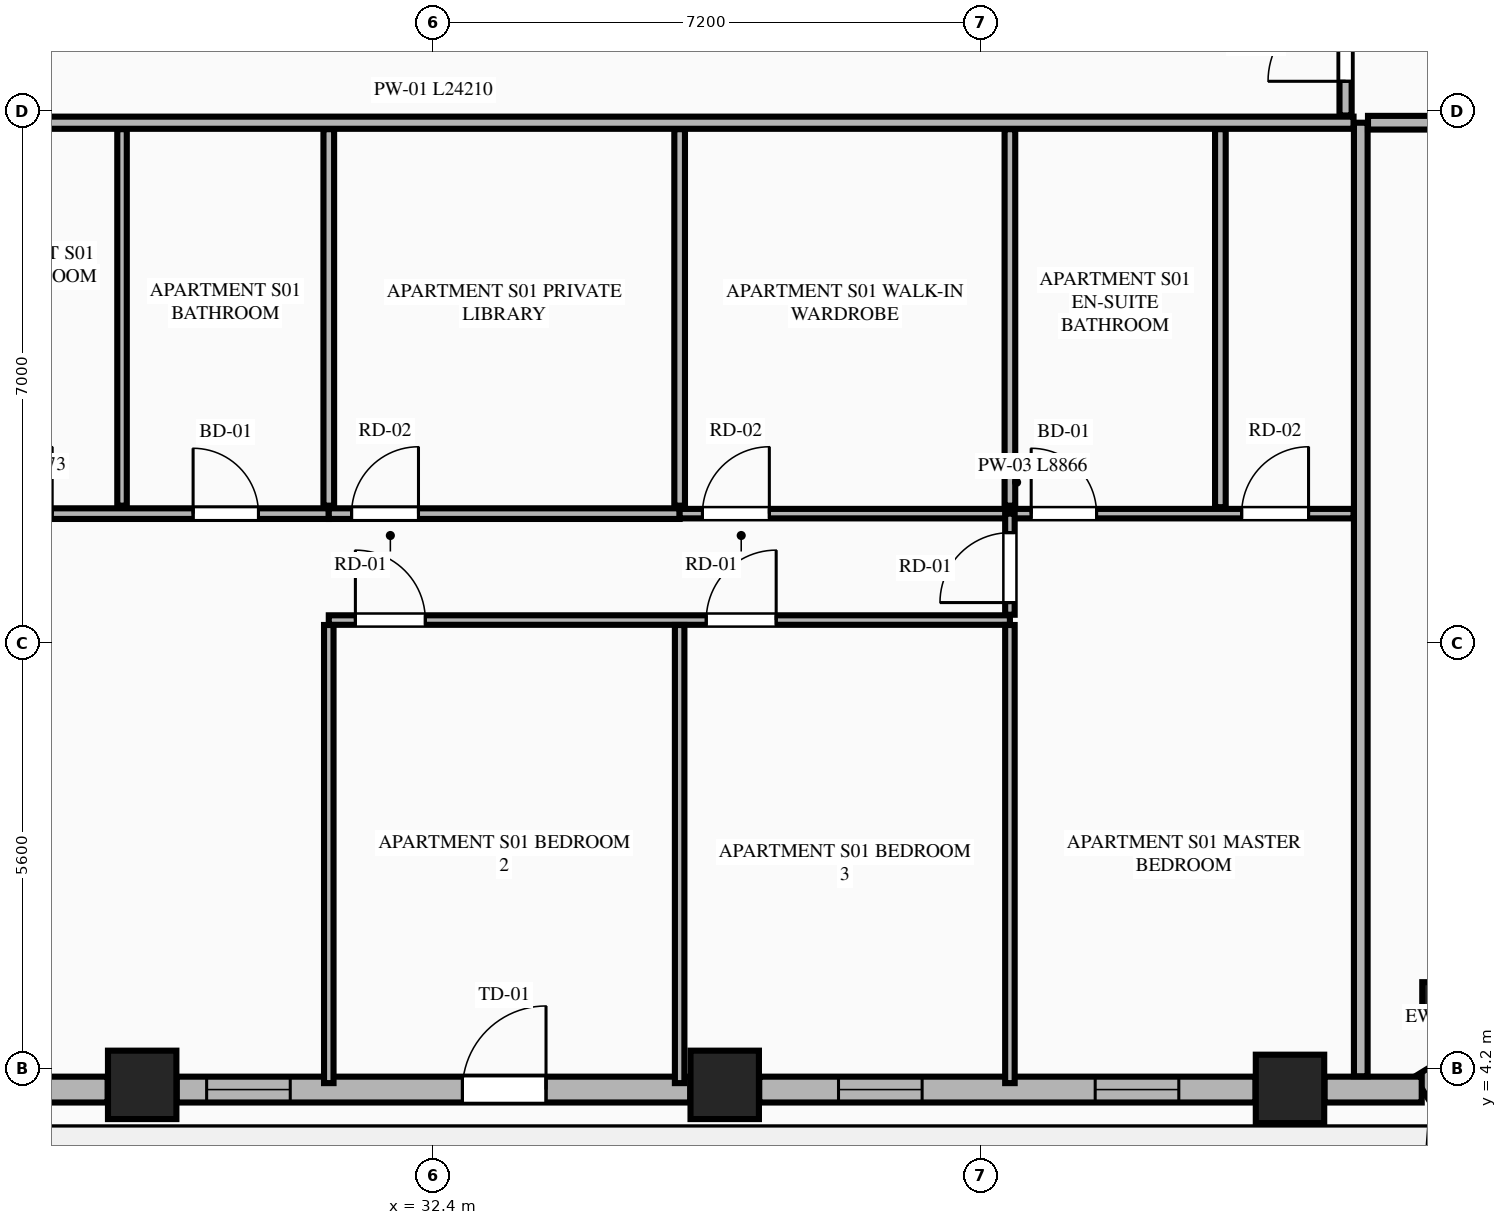
"""IFC4 building model, lengths in metres.
Left out: names, types, materials, properties, quantities, classifications, styles, units other than length and angle.
Written with IfcOpenShell. Run it as: python <this file> out.ifc"""

import sys

from ifc_helpers import new_model, si_unit, direction, frame, frame_2d, origin, origin_2d, place, context, subcontext, project, spatial, rectangle, extrude, element, fill, save


model = new_model("IFC4")
c1 = context("Model", 3, precision=1e-05, world=origin(), true_north=direction((0.0, 1.0)))
c2 = subcontext(c1, "Body", "Model", "MODEL_VIEW")
j1 = project(units=[si_unit("LENGTHUNIT", "METRE"), si_unit("PLANEANGLEUNIT", "RADIAN")], contexts=[c1])
p1 = place(None, origin())
s1 = spatial("IfcSite", under=j1, at=p1, CompositionType="ELEMENT")
p2 = place(p1, origin())
s2 = spatial("IfcBuilding", under=s1, at=p2, CompositionType="ELEMENT")
p3 = place(p2, frame((0.0, 0.0, 164.15)))
s3 = spatial("IfcBuildingStorey", under=s2, at=p3, CompositionType="ELEMENT", Elevation=164.15)
for number, where, z_axis, x_axis in (
    (1, (28.568, 3.992, 0.0), (0.0, 0.0, 1.0), (1.0, 0.0, 0.0)),
    (2, (36.232, 3.992, 0.0), (0.0, 0.0, 1.0), (1.0, 0.0, 0.0)),
    (3, (43.669, 3.939, 0.0), (0.0, 0.0, 1.0), (1.0, 0.0, 0.0)),
):
    element("IfcColumn", number, at=place(p3, frame(where, z_axis=z_axis, x_axis=x_axis)), inside=s3, PredefinedType="COLUMN", context=c2, shape_type="SweptSolid", body=[
        extrude(rectangle(XDim=0.9, YDim=0.9, at=origin_2d()), origin(), (0.0, 0.0, 1.0), 3.55),
    ])
p4 = place(p3, frame((45.659, 5.093, 0.0), z_axis=(0.0, 0.0, 1.0), x_axis=(0.865160173452, 0.501495637342, 0.0)))
e4 = element("IfcColumn", 4, at=p4, inside=s3, PredefinedType="PILASTER", context=c2, shape_type="SweptSolid", body=[
    extrude(rectangle(XDim=0.5, YDim=0.35, at=origin_2d()), origin(), (0.0, 0.0, 1.0), 3.55),
])
p5 = place(p3, frame((45.397, 3.955, 0.0), z_axis=(0.0, 0.0, 1.0), x_axis=(0.851798915137, 0.523868884523, 0.0)))
e5 = element("IfcWall", 5, at=p5, inside=s3, PredefinedType="STANDARD", context=c2, shape_type="SweptSolid", body=[
    extrude(rectangle(XDim=1.848, YDim=0.34, at=frame_2d((0.924, 0.0))), origin(), (0.0, 0.0, 1.0), 3.34),
])
p6 = place(p3, frame((21.585, 3.93, 0.0), z_axis=(0.0, 0.0, 1.0), x_axis=(1.0, 0.0, 0.0)))
e6 = element("IfcWall", 6, at=p6, inside=s3, PredefinedType="STANDARD", context=c2, shape_type="SweptSolid", body=[
    extrude(rectangle(XDim=6.529, YDim=0.34, at=frame_2d((3.265, 0.0))), origin(), (0.0, 0.0, 1.0), 2.797),
])
p7 = place(p6, frame((2.715, 0.0, 0.75)))
e7 = element("IfcOpeningElement", 7, at=p7, cuts=e6, PredefinedType="OPENING", context=c2, shape_type="SweptSolid", body=[
    extrude(rectangle(XDim=1.1, YDim=1.897, at=frame_2d((0.55, 0.948))), frame((0.0, 0.18, 0.0), z_axis=(0.0, -1.0, 0.0), x_axis=(1.0, 0.0, 0.0)), (0.0, 0.0, 1.0), 0.36),
])
p8 = place(p3, frame((29.022, 3.93, 0.0), z_axis=(0.0, 0.0, 1.0), x_axis=(1.0, 0.0, 0.0)))
e8 = element("IfcWall", 8, at=p8, inside=s3, PredefinedType="STANDARD", context=c2, shape_type="SweptSolid", body=[
    extrude(rectangle(XDim=6.756, YDim=0.34, at=frame_2d((3.378, 0.0))), origin(), (0.0, 0.0, 1.0), 2.797),
])
p9 = place(p8, frame((3.759, 0.0, 0.0)))
e9 = element("IfcOpeningElement", 9, at=p9, cuts=e8, PredefinedType="OPENING", context=c2, shape_type="SweptSolid", body=[
    extrude(rectangle(XDim=1.1, YDim=2.25, at=frame_2d((0.55, 1.125))), frame((0.0, 0.18, 0.0), z_axis=(0.0, -1.0, 0.0), x_axis=(1.0, 0.0, 0.0)), (0.0, 0.0, 1.0), 0.36),
])
p10 = place(p8, frame((0.394, 0.0, 0.75)))
e10 = element("IfcOpeningElement", 10, at=p10, cuts=e8, PredefinedType="OPENING", context=c2, shape_type="SweptSolid", body=[
    extrude(rectangle(XDim=1.1, YDim=1.897, at=frame_2d((0.55, 0.948))), frame((0.0, 0.18, 0.0), z_axis=(0.0, -1.0, 0.0), x_axis=(1.0, 0.0, 0.0)), (0.0, 0.0, 1.0), 0.36),
])
p11 = place(p3, frame((36.686, 3.93, 0.0), z_axis=(0.0, 0.0, 1.0), x_axis=(1.0, 0.0, 0.0)))
e11 = element("IfcWall", 11, at=p11, inside=s3, PredefinedType="STANDARD", context=c2, shape_type="SweptSolid", body=[
    extrude(rectangle(XDim=6.529, YDim=0.34, at=frame_2d((3.265, 0.0))), origin(), (0.0, 0.0, 1.0), 2.797),
])
p12 = place(p11, frame((1.043, 0.0, 0.75)))
e12 = element("IfcOpeningElement", 12, at=p12, cuts=e11, PredefinedType="OPENING", context=c2, shape_type="SweptSolid", body=[
    extrude(rectangle(XDim=1.1, YDim=1.897, at=frame_2d((0.55, 0.948))), frame((0.0, 0.18, 0.0), z_axis=(0.0, -1.0, 0.0), x_axis=(1.0, 0.0, 0.0)), (0.0, 0.0, 1.0), 0.36),
])
p13 = place(p11, frame((4.42, 0.0, 0.75)))
e13 = element("IfcOpeningElement", 13, at=p13, cuts=e11, PredefinedType="OPENING", context=c2, shape_type="SweptSolid", body=[
    extrude(rectangle(XDim=1.1, YDim=1.897, at=frame_2d((0.55, 0.948))), frame((0.0, 0.18, 0.0), z_axis=(0.0, -1.0, 0.0), x_axis=(1.0, 0.0, 0.0)), (0.0, 0.0, 1.0), 0.36),
])
p14 = place(p3, frame((44.123, 3.93, 0.0), z_axis=(0.0, 0.0, 1.0), x_axis=(1.0, 0.0, 0.0)))
e14 = element("IfcWall", 14, at=p14, inside=s3, PredefinedType="STANDARD", context=c2, shape_type="SweptSolid", body=[
    extrude(rectangle(XDim=1.279, YDim=0.34, at=frame_2d((0.64, 0.0))), origin(), (0.0, 0.0, 1.0), 3.34),
])
p15 = place(p3, frame((44.6, 4.105, 0.0), z_axis=(0.0, 0.0, 1.0), x_axis=(0.0, 1.0, 0.0)))
e15 = element("IfcWall", 15, at=p15, inside=s3, PredefinedType="PARTITIONING", context=c2, shape_type="SweptSolid", body=[
    extrude(rectangle(XDim=12.545, YDim=0.18, at=frame_2d((6.272, 0.0))), origin(), (0.0, 0.0, 1.0), 3.34),
])
p16 = place(p3, frame((20.295, 16.65, 0.0), z_axis=(0.0, 0.0, 1.0), x_axis=(1.0, 0.0, 0.0)))
e16 = element("IfcWall", 16, at=p16, inside=s3, PredefinedType="PARTITIONING", context=c2, shape_type="SweptSolid", body=[
    extrude(rectangle(XDim=24.21, YDim=0.16, at=frame_2d((12.105, 0.0))), origin(), (0.0, 0.0, 1.0), 3.34),
])
p17 = place(p16, frame((0.405, 0.0, 0.0)))
e17 = element("IfcOpeningElement", 17, at=p17, cuts=e16, PredefinedType="OPENING", context=c2, shape_type="SweptSolid", body=[
    extrude(rectangle(XDim=1.35, YDim=2.35, at=frame_2d((0.675, 1.175))), frame((0.0, 0.09, 0.0), z_axis=(0.0, -1.0, 0.0), x_axis=(1.0, 0.0, 0.0)), (0.0, 0.0, 1.0), 0.18),
])
p18 = place(p3, frame((22.25, 11.507, 0.0), z_axis=(0.0, 0.0, 1.0), x_axis=(1.0, 0.0, 0.0)))
e18 = element("IfcWall", 18, at=p18, inside=s3, PredefinedType="PLUMBINGWALL", context=c2, shape_type="SweptSolid", body=[
    extrude(rectangle(XDim=8.773, YDim=0.14, at=frame_2d((4.386, 0.0))), origin(), (0.0, 0.0, 1.0), 3.34),
])
p19 = place(p18, frame((6.988, 0.0, 0.0)))
e19 = element("IfcOpeningElement", 19, at=p19, cuts=e18, PredefinedType="OPENING", context=c2, shape_type="SweptSolid", body=[
    extrude(rectangle(XDim=0.86, YDim=2.1, at=frame_2d((0.43, 1.05))), frame((0.0, 0.08, 0.0), z_axis=(0.0, -1.0, 0.0), x_axis=(1.0, 0.0, 0.0)), (0.0, 0.0, 1.0), 0.16),
])
p20 = place(p18, frame((0.26, 0.0, 0.0)))
e20 = element("IfcOpeningElement", 20, at=p20, cuts=e18, PredefinedType="OPENING", context=c2, shape_type="SweptSolid", body=[
    extrude(rectangle(XDim=0.88, YDim=2.15, at=frame_2d((0.44, 1.075))), frame((0.0, 0.08, 0.0), z_axis=(0.0, -1.0, 0.0), x_axis=(1.0, 0.0, 0.0)), (0.0, 0.0, 1.0), 0.16),
])
p21 = place(p18, frame((4.254, 0.0, 0.0)))
e21 = element("IfcOpeningElement", 21, at=p21, cuts=e18, PredefinedType="OPENING", context=c2, shape_type="SweptSolid", body=[
    extrude(rectangle(XDim=0.88, YDim=2.15, at=frame_2d((0.44, 1.075))), frame((0.0, 0.08, 0.0), z_axis=(0.0, -1.0, 0.0), x_axis=(1.0, 0.0, 0.0)), (0.0, 0.0, 1.0), 0.16),
])
p22 = place(p3, frame((31.023, 11.507, 0.0), z_axis=(0.0, 0.0, 1.0), x_axis=(1.0, 0.0, 0.0)))
e22 = element("IfcWall", 22, at=p22, inside=s3, PredefinedType="PLUMBINGWALL", context=c2, shape_type="SweptSolid", body=[
    extrude(rectangle(XDim=4.616, YDim=0.14, at=frame_2d((2.308, 0.0))), origin(), (0.0, 0.0, 1.0), 3.34),
])
p23 = place(p22, frame((0.3, 0.0, 0.0)))
e23 = element("IfcOpeningElement", 23, at=p23, cuts=e22, PredefinedType="OPENING", context=c2, shape_type="SweptSolid", body=[
    extrude(rectangle(XDim=0.88, YDim=2.15, at=frame_2d((0.44, 1.075))), frame((0.0, 0.08, 0.0), z_axis=(0.0, -1.0, 0.0), x_axis=(1.0, 0.0, 0.0)), (0.0, 0.0, 1.0), 0.16),
])
p24 = place(p3, frame((35.639, 11.507, 0.0), z_axis=(0.0, 0.0, 1.0), x_axis=(1.0, 0.0, 0.0)))
e24 = element("IfcWall", 24, at=p24, inside=s3, PredefinedType="PARTITIONING", context=c2, shape_type="SweptSolid", body=[
    extrude(rectangle(XDim=8.866, YDim=0.125, at=frame_2d((4.433, 0.0))), origin(), (0.0, 0.0, 1.0), 3.34),
])
p25 = place(p24, frame((4.625, 0.0, 0.0)))
e25 = element("IfcOpeningElement", 25, at=p25, cuts=e24, PredefinedType="OPENING", context=c2, shape_type="SweptSolid", body=[
    extrude(rectangle(XDim=0.86, YDim=2.1, at=frame_2d((0.43, 1.05))), frame((0.0, 0.073, 0.0), z_axis=(0.0, -1.0, 0.0), x_axis=(1.0, 0.0, 0.0)), (0.0, 0.0, 1.0), 0.145),
])
p26 = place(p24, frame((7.394, 0.0, 0.0)))
e26 = element("IfcOpeningElement", 26, at=p26, cuts=e24, PredefinedType="OPENING", context=c2, shape_type="SweptSolid", body=[
    extrude(rectangle(XDim=0.88, YDim=2.15, at=frame_2d((0.44, 1.075))), frame((0.0, 0.073, 0.0), z_axis=(0.0, -1.0, 0.0), x_axis=(1.0, 0.0, 0.0)), (0.0, 0.0, 1.0), 0.145),
])
p27 = place(p24, frame((0.3, 0.0, 0.0)))
e27 = element("IfcOpeningElement", 27, at=p27, cuts=e24, PredefinedType="OPENING", context=c2, shape_type="SweptSolid", body=[
    extrude(rectangle(XDim=0.88, YDim=2.15, at=frame_2d((0.44, 1.075))), frame((0.0, 0.073, 0.0), z_axis=(0.0, -1.0, 0.0), x_axis=(1.0, 0.0, 0.0)), (0.0, 0.0, 1.0), 0.145),
])
p28 = place(p3, frame((28.303, 11.612, 0.0), z_axis=(0.0, 0.0, 1.0), x_axis=(0.0, 1.0, 0.0)))
e28 = element("IfcWall", 28, at=p28, inside=s3, PredefinedType="PARTITIONING", context=c2, shape_type="SweptSolid", body=[
    extrude(rectangle(XDim=4.953, YDim=0.125, at=frame_2d((2.477, 0.0))), origin(), (0.0, 0.0, 1.0), 3.34),
])
p29 = place(p3, frame((31.023, 4.015, 0.0), z_axis=(0.0, 0.0, 1.0), x_axis=(0.0, 1.0, 0.0)))
e29 = element("IfcWall", 29, at=p29, inside=s3, PredefinedType="PARTITIONING", context=c2, shape_type="SweptSolid", body=[
    extrude(rectangle(XDim=6.027, YDim=0.125, at=frame_2d((3.014, 0.0))), origin(), (0.0, 0.0, 1.0), 3.34),
])
p30 = place(p3, frame((31.023, 10.107, 0.0), z_axis=(0.0, 0.0, 1.0), x_axis=(1.0, 0.0, 0.0)))
e30 = element("IfcWall", 30, at=p30, inside=s3, PredefinedType="PARTITIONING", context=c2, shape_type="SweptSolid", body=[
    extrude(rectangle(XDim=8.961, YDim=0.125, at=frame_2d((4.48, 0.0))), origin(), (0.0, 0.0, 1.0), 3.34),
])
p31 = place(p30, frame((0.35, 0.0, 0.0)))
e31 = element("IfcOpeningElement", 31, at=p31, cuts=e30, PredefinedType="OPENING", context=c2, shape_type="SweptSolid", body=[
    extrude(rectangle(XDim=0.92, YDim=2.15, at=frame_2d((0.46, 1.075))), frame((0.0, 0.073, 0.0), z_axis=(0.0, -1.0, 0.0), x_axis=(1.0, 0.0, 0.0)), (0.0, 0.0, 1.0), 0.145),
])
p32 = place(p30, frame((4.966, 0.0, 0.0)))
e32 = element("IfcOpeningElement", 32, at=p32, cuts=e30, PredefinedType="OPENING", context=c2, shape_type="SweptSolid", body=[
    extrude(rectangle(XDim=0.92, YDim=2.15, at=frame_2d((0.46, 1.075))), frame((0.0, 0.073, 0.0), z_axis=(0.0, -1.0, 0.0), x_axis=(1.0, 0.0, 0.0)), (0.0, 0.0, 1.0), 0.145),
])
p33 = place(p3, frame((39.984, 10.177, 0.0), z_axis=(0.0, 0.0, 1.0), x_axis=(0.0, 1.0, 0.0)))
e33 = element("IfcWall", 33, at=p33, inside=s3, PredefinedType="PARTITIONING", context=c2, shape_type="SweptSolid", body=[
    extrude(rectangle(XDim=1.33, YDim=0.125, at=frame_2d((0.665, 0.0))), origin(), (0.0, 0.0, 1.0), 3.34),
])
p34 = place(p33, frame((0.16, 0.0, 0.0)))
e34 = element("IfcOpeningElement", 34, at=p34, cuts=e33, PredefinedType="OPENING", context=c2, shape_type="SweptSolid", body=[
    extrude(rectangle(XDim=0.92, YDim=2.15, at=frame_2d((0.46, 1.075))), frame((0.0, 0.073, 0.0), z_axis=(0.0, -1.0, 0.0), x_axis=(1.0, 0.0, 0.0)), (0.0, 0.0, 1.0), 0.145),
])
for number, where, z_axis, x_axis in (
    (35, (31.023, 11.612, 0.0), (0.0, 0.0, 1.0), (0.0, 1.0, 0.0)),
    (36, (35.639, 11.612, 0.0), (0.0, 0.0, 1.0), (0.0, 1.0, 0.0)),
):
    element("IfcWall", number, at=place(p3, frame(where, z_axis=z_axis, x_axis=x_axis)), inside=s3, PredefinedType="PLUMBINGWALL", context=c2, shape_type="SweptSolid", body=[
        extrude(rectangle(XDim=4.953, YDim=0.14, at=frame_2d((2.477, 0.0))), origin(), (0.0, 0.0, 1.0), 3.34),
    ])
for number, where, z_axis, x_axis in (
    (37, (35.639, 4.015, 0.0), (0.0, 0.0, 1.0), (0.0, 1.0, 0.0)),
    (38, (39.984, 4.015, 0.0), (0.0, 0.0, 1.0), (0.0, 1.0, 0.0)),
):
    element("IfcWall", number, at=place(p3, frame(where, z_axis=z_axis, x_axis=x_axis)), inside=s3, PredefinedType="PARTITIONING", context=c2, shape_type="SweptSolid", body=[
        extrude(rectangle(XDim=6.027, YDim=0.125, at=frame_2d((3.014, 0.0))), origin(), (0.0, 0.0, 1.0), 3.34),
    ])
p35 = place(p3, frame((39.984, 11.612, 0.0), z_axis=(0.0, 0.0, 1.0), x_axis=(0.0, 1.0, 0.0)))
e39 = element("IfcWall", 39, at=p35, inside=s3, PredefinedType="PLUMBINGWALL", context=c2, shape_type="SweptSolid", body=[
    extrude(rectangle(XDim=4.953, YDim=0.14, at=frame_2d((2.477, 0.0))), origin(), (0.0, 0.0, 1.0), 3.34),
])
p36 = place(p3, frame((42.753, 11.592, 0.0), z_axis=(0.0, 0.0, 1.0), x_axis=(0.0, 1.0, 0.0)))
e40 = element("IfcWall", 40, at=p36, inside=s3, PredefinedType="PLUMBINGWALL", context=c2, shape_type="SweptSolid", body=[
    extrude(rectangle(XDim=4.973, YDim=0.14, at=frame_2d((2.486, 0.0))), origin(), (0.0, 0.0, 1.0), 2.722),
])
p37 = place(p3, frame((44.695, 16.65, 0.0), z_axis=(0.0, 0.0, 1.0), x_axis=(1.0, 0.0, 0.0)))
e41 = element("IfcWall", 41, at=p37, inside=s3, PredefinedType="PARTITIONING", context=c2, shape_type="SweptSolid", body=[
    extrude(rectangle(XDim=7.996, YDim=0.18, at=frame_2d((3.998, 0.0))), origin(), (0.0, 0.0, 1.0), 3.34),
])
p38 = place(p3, frame((44.4, 16.745, 0.0), z_axis=(0.0, 0.0, 1.0), x_axis=(0.0, 1.0, 0.0)))
e42 = element("IfcWall", 42, at=p38, inside=s3, PredefinedType="PARTITIONING", context=c2, shape_type="SweptSolid", body=[
    extrude(rectangle(XDim=18.31, YDim=0.16, at=frame_2d((9.155, 0.0))), origin(), (0.0, 0.0, 1.0), 3.34),
])
p39 = place(p38, frame((0.45, 0.0, 0.0)))
e43 = element("IfcOpeningElement", 43, at=p39, cuts=e42, PredefinedType="OPENING", context=c2, shape_type="SweptSolid", body=[
    extrude(rectangle(XDim=1.02, YDim=2.25, at=frame_2d((0.51, 1.125))), frame((0.0, 0.09, 0.0), z_axis=(0.0, -1.0, 0.0), x_axis=(1.0, 0.0, 0.0)), (0.0, 0.0, 1.0), 0.18),
])
p40 = place(p9, origin())
e44 = element("IfcDoor", 44, at=p40, inside=s3, OperationType="SINGLE_SWING_RIGHT", PredefinedType="DOOR", context=c2, shape_type="SweptSolid", body=[
    extrude(rectangle(XDim=1.1, YDim=2.25, at=frame_2d((0.55, 1.125))), frame((0.0, 0.025, 0.0), z_axis=(0.0, -1.0, 0.0), x_axis=(1.0, 0.0, 0.0)), (0.0, 0.0, 1.0), 0.05),
])
fill(e9, e44)
p41 = place(p12, origin())
e45 = element("IfcWindow", 45, at=p41, inside=s3, PartitioningType="SINGLE_PANEL", PredefinedType="WINDOW", context=c2, shape_type="SweptSolid", body=[
    extrude(rectangle(XDim=1.1, YDim=1.897, at=frame_2d((0.55, 0.948))), frame((0.0, 0.03, 0.0), z_axis=(0.0, -1.0, 0.0), x_axis=(1.0, 0.0, 0.0)), (0.0, 0.0, 1.0), 0.06),
])
fill(e12, e45)
p42 = place(p19, origin())
e46 = element("IfcDoor", 46, at=p42, inside=s3, OperationType="SINGLE_SWING_LEFT", PredefinedType="DOOR", context=c2, shape_type="SweptSolid", body=[
    extrude(rectangle(XDim=0.86, YDim=2.1, at=frame_2d((0.43, 1.05))), frame((0.0, 0.025, 0.0), z_axis=(0.0, -1.0, 0.0), x_axis=(1.0, 0.0, 0.0)), (0.0, 0.0, 1.0), 0.05),
])
fill(e19, e46)
p43 = place(p25, origin())
e47 = element("IfcDoor", 47, at=p43, inside=s3, OperationType="SINGLE_SWING_LEFT", PredefinedType="DOOR", context=c2, shape_type="SweptSolid", body=[
    extrude(rectangle(XDim=0.86, YDim=2.1, at=frame_2d((0.43, 1.05))), frame((0.0, 0.025, 0.0), z_axis=(0.0, -1.0, 0.0), x_axis=(1.0, 0.0, 0.0)), (0.0, 0.0, 1.0), 0.05),
])
fill(e25, e47)
p44 = place(p26, origin())
e48 = element("IfcDoor", 48, at=p44, inside=s3, OperationType="SINGLE_SWING_RIGHT", PredefinedType="DOOR", context=c2, shape_type="SweptSolid", body=[
    extrude(rectangle(XDim=0.88, YDim=2.15, at=frame_2d((0.44, 1.075))), frame((0.0, 0.025, 0.0), z_axis=(0.0, -1.0, 0.0), x_axis=(1.0, 0.0, 0.0)), (0.0, 0.0, 1.0), 0.05),
])
fill(e26, e48)
p45 = place(p21, origin())
e49 = element("IfcDoor", 49, at=p45, inside=s3, OperationType="SINGLE_SWING_RIGHT", PredefinedType="DOOR", context=c2, shape_type="SweptSolid", body=[
    extrude(rectangle(XDim=0.88, YDim=2.15, at=frame_2d((0.44, 1.075))), frame((0.0, 0.025, 0.0), z_axis=(0.0, -1.0, 0.0), x_axis=(1.0, 0.0, 0.0)), (0.0, 0.0, 1.0), 0.05),
])
fill(e21, e49)
p46 = place(p23, origin())
e50 = element("IfcDoor", 50, at=p46, inside=s3, OperationType="SINGLE_SWING_RIGHT", PredefinedType="DOOR", context=c2, shape_type="SweptSolid", body=[
    extrude(rectangle(XDim=0.88, YDim=2.15, at=frame_2d((0.44, 1.075))), frame((0.0, 0.025, 0.0), z_axis=(0.0, -1.0, 0.0), x_axis=(1.0, 0.0, 0.0)), (0.0, 0.0, 1.0), 0.05),
])
fill(e23, e50)
p47 = place(p31, origin())
e51 = element("IfcDoor", 51, at=p47, inside=s3, OperationType="SINGLE_SWING_LEFT", PredefinedType="DOOR", context=c2, shape_type="SweptSolid", body=[
    extrude(rectangle(XDim=0.92, YDim=2.15, at=frame_2d((0.46, 1.075))), frame((0.0, 0.025, 0.0), z_axis=(0.0, -1.0, 0.0), x_axis=(1.0, 0.0, 0.0)), (0.0, 0.0, 1.0), 0.05),
])
fill(e31, e51)
p48 = place(p32, origin())
e52 = element("IfcDoor", 52, at=p48, inside=s3, OperationType="SINGLE_SWING_RIGHT", PredefinedType="DOOR", context=c2, shape_type="SweptSolid", body=[
    extrude(rectangle(XDim=0.92, YDim=2.15, at=frame_2d((0.46, 1.075))), frame((0.0, 0.025, 0.0), z_axis=(0.0, -1.0, 0.0), x_axis=(1.0, 0.0, 0.0)), (0.0, 0.0, 1.0), 0.05),
])
fill(e32, e52)
p49 = place(p34, origin())
e53 = element("IfcDoor", 53, at=p49, inside=s3, OperationType="SINGLE_SWING_LEFT", PredefinedType="DOOR", context=c2, shape_type="SweptSolid", body=[
    extrude(rectangle(XDim=0.92, YDim=2.15, at=frame_2d((0.46, 1.075))), frame((0.0, 0.025, 0.0), z_axis=(0.0, -1.0, 0.0), x_axis=(1.0, 0.0, 0.0)), (0.0, 0.0, 1.0), 0.05),
])
fill(e34, e53)
p50 = place(p27, origin())
e54 = element("IfcDoor", 54, at=p50, inside=s3, OperationType="SINGLE_SWING_RIGHT", PredefinedType="DOOR", context=c2, shape_type="SweptSolid", body=[
    extrude(rectangle(XDim=0.88, YDim=2.15, at=frame_2d((0.44, 1.075))), frame((0.0, 0.025, 0.0), z_axis=(0.0, -1.0, 0.0), x_axis=(1.0, 0.0, 0.0)), (0.0, 0.0, 1.0), 0.05),
])
fill(e27, e54)
p51 = place(p39, origin())
e55 = element("IfcDoor", 55, at=p51, inside=s3, OperationType="SINGLE_SWING_LEFT", PredefinedType="DOOR", context=c2, shape_type="SweptSolid", body=[
    extrude(rectangle(XDim=1.02, YDim=2.25, at=frame_2d((0.51, 1.125))), frame((0.0, 0.025, 0.0), z_axis=(0.0, -1.0, 0.0), x_axis=(1.0, 0.0, 0.0)), (0.0, 0.0, 1.0), 0.05),
])
fill(e43, e55)
p52 = place(p10, origin())
e56 = element("IfcWindow", 56, at=p52, inside=s3, PartitioningType="SINGLE_PANEL", PredefinedType="WINDOW", context=c2, shape_type="SweptSolid", body=[
    extrude(rectangle(XDim=1.1, YDim=1.897, at=frame_2d((0.55, 0.948))), frame((0.0, 0.03, 0.0), z_axis=(0.0, -1.0, 0.0), x_axis=(1.0, 0.0, 0.0)), (0.0, 0.0, 1.0), 0.06),
])
fill(e10, e56)
p53 = place(p13, origin())
e57 = element("IfcWindow", 57, at=p53, inside=s3, PartitioningType="SINGLE_PANEL", PredefinedType="WINDOW", context=c2, shape_type="SweptSolid", body=[
    extrude(rectangle(XDim=1.1, YDim=1.897, at=frame_2d((0.55, 0.948))), frame((0.0, 0.03, 0.0), z_axis=(0.0, -1.0, 0.0), x_axis=(1.0, 0.0, 0.0)), (0.0, 0.0, 1.0), 0.06),
])
fill(e13, e57)
save(model, sys.argv[1])
